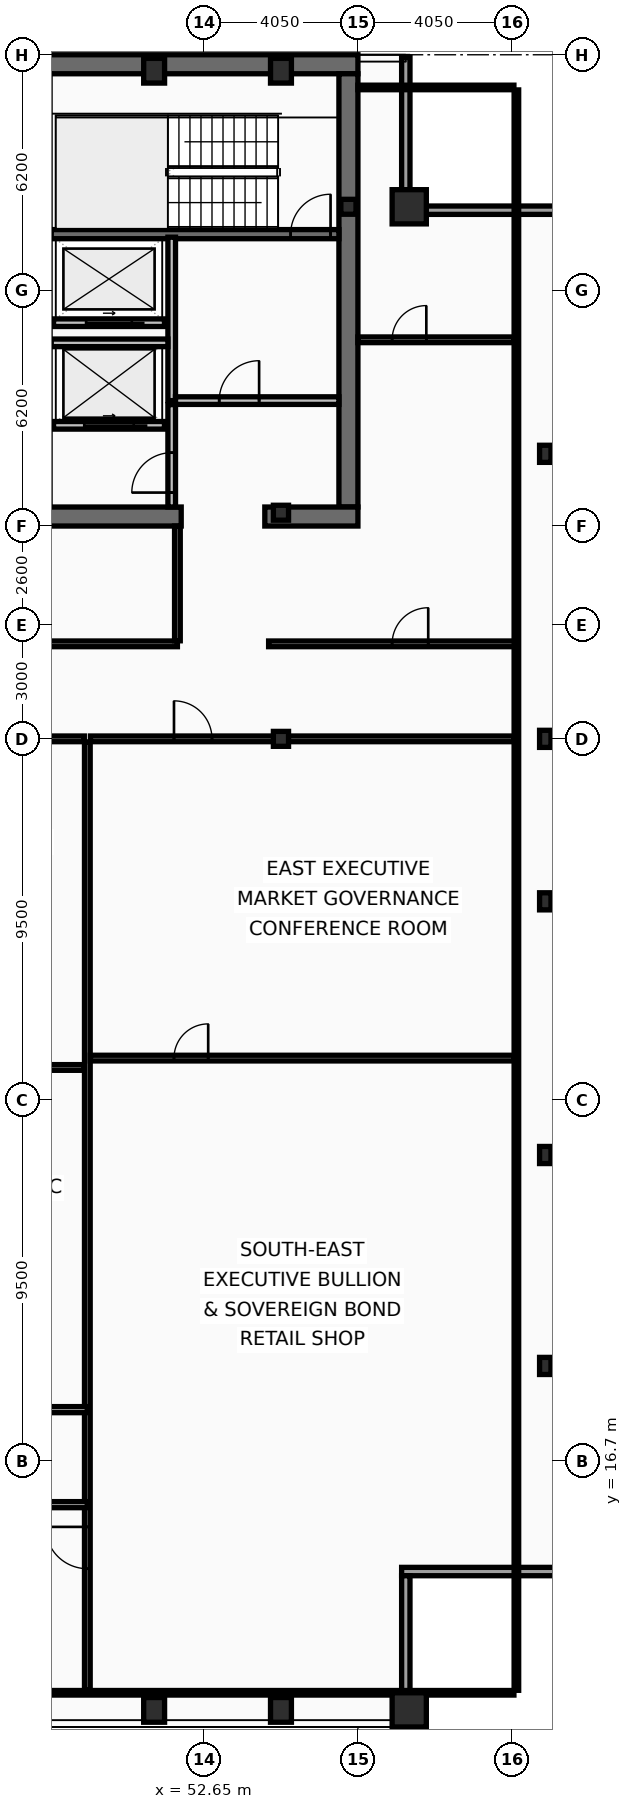
"""IFC4 building model, lengths in metres.
Left out: names, types, materials, properties, quantities, classifications, styles, units other than length and angle.
Written with IfcOpenShell. Run it as: python <this file> out.ifc"""

import sys

from ifc_helpers import new_model, si_unit, direction, frame, frame_2d, origin, origin_2d, place, context, subcontext, project, spatial, rectangle, hollow_rectangle, i_section, extrude, element, fill, save


model = new_model("IFC4")
c1 = context("Model", 3, precision=1e-05, world=origin(), true_north=direction((0.0, 1.0)))
c2 = subcontext(c1, "Body", "Model", "MODEL_VIEW")
j1 = project(units=[si_unit("LENGTHUNIT", "METRE"), si_unit("PLANEANGLEUNIT", "RADIAN")], contexts=[c1])
p1 = place(None, origin())
s1 = spatial("IfcSite", under=j1, at=p1, CompositionType="ELEMENT")
p2 = place(p1, origin())
s2 = spatial("IfcBuilding", under=s1, at=p2, CompositionType="ELEMENT")
p3 = place(p2, frame((0.0, 0.0, 347.0)))
s3 = spatial("IfcBuildingStorey", under=s2, at=p3, CompositionType="ELEMENT", Elevation=347.0)
p4 = place(p3, frame((16.2, 53.45, 0.0), z_axis=(0.0, 0.0, 1.0), x_axis=(1.0, 0.0, 0.0)))
e1 = element("IfcWall", 1, at=p4, inside=s3, PredefinedType="SHEAR", context=c2, shape_type="SweptSolid", body=[
    extrude(rectangle(XDim=40.5, YDim=0.5, at=frame_2d((20.25, 0.0))), origin(), (0.0, 0.0, 1.0), 3.38),
])
p5 = place(p3, frame((56.45, 53.2, 0.0), z_axis=(0.0, 0.0, 1.0), x_axis=(0.0, -1.0, 0.0)))
e2 = element("IfcWall", 2, at=p5, inside=s3, PredefinedType="SHEAR", context=c2, shape_type="SweptSolid", body=[
    extrude(rectangle(XDim=11.4, YDim=0.5, at=frame_2d((5.7, 0.0))), origin(), (0.0, 0.0, 1.0), 3.38),
])
p6 = place(p3, frame((52.05, 41.55, 0.0), z_axis=(0.0, 0.0, 1.0), x_axis=(-1.0, 0.0, 0.0)))
e3 = element("IfcWall", 3, at=p6, inside=s3, PredefinedType="SHEAR", context=c2, shape_type="SweptSolid", body=[
    extrude(rectangle(XDim=11.3, YDim=0.5, at=frame_2d((5.65, 0.0))), origin(), (0.0, 0.0, 1.0), 3.38),
])
p7 = place(p3, frame((56.7, 41.55, 0.0), z_axis=(0.0, 0.0, 1.0), x_axis=(-1.0, 0.0, 0.0)))
e4 = element("IfcWall", 4, at=p7, inside=s3, PredefinedType="SHEAR", context=c2, shape_type="SweptSolid", body=[
    extrude(rectangle(XDim=2.45, YDim=0.5, at=frame_2d((1.225, 0.0))), origin(), (0.0, 0.0, 1.0), 3.38),
])
p8 = place(p3, frame((48.63, 48.98, 0.0), z_axis=(0.0, 0.0, 1.0), x_axis=(1.0, 0.0, 0.0)))
e5 = element("IfcWall", 5, at=p8, inside=s3, PredefinedType="SHEAR", context=c2, shape_type="SweptSolid", body=[
    extrude(rectangle(XDim=7.57, YDim=0.24, at=frame_2d((3.785, 0.0))), origin(), (0.0, 0.0, 1.0), 3.38),
])
p9 = place(p8, frame((6.3, 0.0, 0.0)))
e6 = element("IfcOpeningElement", 6, at=p9, cuts=e5, PredefinedType="OPENING", context=c2, shape_type="SweptSolid", body=[
    extrude(rectangle(XDim=1.05, YDim=2.15, at=frame_2d((0.525, 1.075))), frame((0.0, 0.13, 0.0), z_axis=(0.0, -1.0, 0.0), x_axis=(1.0, 0.0, 0.0)), (0.0, 0.0, 1.0), 0.26),
])
for number, where, z_axis, x_axis in (
    (7, (58.05, 10.15, 0.0), (0.0, 0.0, 1.0), (1.0, 0.0, 0.0)),
    (8, (58.05, 49.7, 0.0), (0.0, 0.0, 1.0), (1.0, 0.0, 0.0)),
):
    element("IfcColumn", number, at=place(p3, frame(where, z_axis=z_axis, x_axis=x_axis)), inside=s3, PredefinedType="COLUMN", context=c2, shape_type="SweptSolid", body=[
        extrude(hollow_rectangle(XDim=0.9, YDim=0.9, WallThickness=0.05, at=origin_2d()), origin(), (0.0, 0.0, 1.0), 3.6),
    ])
for number, where, z_axis, x_axis in (
    (9, (51.337, 10.15, 0.0), (0.0, 0.0, 1.0), (1.0, 0.0, 0.0)),
    (10, (54.675, 10.15, 0.0), (0.0, 0.0, 1.0), (1.0, 0.0, 0.0)),
    (11, (51.337, 53.28, 0.0), (0.0, 0.0, 1.0), (1.0, 0.0, 0.0)),
    (12, (54.675, 53.28, 0.0), (0.0, 0.0, 1.0), (1.0, 0.0, 0.0)),
):
    element("IfcColumn", number, at=place(p3, frame(where, z_axis=z_axis, x_axis=x_axis)), inside=s3, PredefinedType="COLUMN", context=c2, shape_type="SweptSolid", body=[
        extrude(hollow_rectangle(XDim=0.55, YDim=0.65, WallThickness=0.04, at=origin_2d()), origin(), (0.0, 0.0, 1.0), 3.6),
    ])
for number, where, z_axis, x_axis in (
    (13, (61.63, 19.2, 0.0), (0.0, 0.0, 1.0), (1.0, 0.0, 0.0)),
    (14, (61.63, 24.75, 0.0), (0.0, 0.0, 1.0), (1.0, 0.0, 0.0)),
    (15, (61.63, 31.425, 0.0), (0.0, 0.0, 1.0), (1.0, 0.0, 0.0)),
    (16, (61.63, 35.7, 0.0), (0.0, 0.0, 1.0), (1.0, 0.0, 0.0)),
    (17, (61.63, 43.2, 0.0), (0.0, 0.0, 1.0), (1.0, 0.0, 0.0)),
):
    element("IfcColumn", number, at=place(p3, frame(where, z_axis=z_axis, x_axis=x_axis)), inside=s3, PredefinedType="COLUMN", context=c2, shape_type="SweptSolid", body=[
        extrude(i_section(OverallWidth=0.3, OverallDepth=0.45, WebThickness=0.014, FlangeThickness=0.026, at=origin_2d()), origin(), (0.0, 0.0, 1.0), 3.6),
    ])
for number, where, z_axis, x_axis in (
    (18, (56.45, 49.7, 0.0), (0.0, 0.0, 1.0), (1.0, 0.0, 0.0)),
    (19, (54.675, 35.7, 0.0), (0.0, 0.0, 1.0), (1.0, 0.0, 0.0)),
    (20, (54.675, 41.65, 0.0), (0.0, 0.0, 1.0), (1.0, 0.0, 0.0)),
):
    element("IfcColumn", number, at=place(p3, frame(where, z_axis=z_axis, x_axis=x_axis)), inside=s3, PredefinedType="COLUMN", context=c2, shape_type="SweptSolid", body=[
        extrude(i_section(OverallWidth=0.399, OverallDepth=0.393, WebThickness=0.023, FlangeThickness=0.037, at=origin_2d()), origin(), (0.0, 0.0, 1.0), 3.6),
    ])
p10 = place(p3, frame((57.96, 53.63, 0.0), z_axis=(0.0, 0.0, 1.0), x_axis=(0.0, -1.0, 0.0)))
e21 = element("IfcWall", 21, at=p10, inside=s3, PredefinedType="SOLIDWALL", context=c2, shape_type="SweptSolid", body=[
    extrude(rectangle(XDim=3.91, YDim=0.22, at=frame_2d((1.955, 0.0))), origin(), (0.0, 0.0, 1.0), 2.82),
])
for number, where, z_axis, x_axis in (
    (22, (57.85, 49.61, 0.0), (0.0, 0.0, 1.0), (1.0, 0.0, 0.0)),
    (23, (61.98, 13.79, 0.0), (0.0, 0.0, 1.0), (-1.0, 0.0, 0.0)),
):
    element("IfcWall", number, at=place(p3, frame(where, z_axis=z_axis, x_axis=x_axis)), inside=s3, PredefinedType="SOLIDWALL", context=c2, shape_type="SweptSolid", body=[
        extrude(rectangle(XDim=4.13, YDim=0.22, at=frame_2d((2.065, 0.0))), origin(), (0.0, 0.0, 1.0), 2.82),
    ])
p11 = place(p3, frame((57.96, 13.68, 0.0), z_axis=(0.0, 0.0, 1.0), x_axis=(0.0, -1.0, 0.0)))
e24 = element("IfcWall", 24, at=p11, inside=s3, PredefinedType="SOLIDWALL", context=c2, shape_type="SweptSolid", body=[
    extrude(rectangle(XDim=3.91, YDim=0.22, at=frame_2d((1.955, 0.0))), origin(), (0.0, 0.0, 1.0), 2.82),
])
p12 = place(p3, frame((51.61, 43.95, 0.0), z_axis=(0.0, 0.0, 1.0), x_axis=(-1.0, 0.0, 0.0)))
e25 = element("IfcWall", 25, at=p12, inside=s3, PredefinedType="PARTITIONING", context=c2, shape_type="SweptSolid", body=[
    extrude(rectangle(XDim=2.92, YDim=0.2, at=frame_2d((1.46, 0.0))), origin(), (0.0, 0.0, 1.0), 3.38),
])
p13 = place(p12, frame((0.81, 0.0, 0.0)))
e26 = element("IfcOpeningElement", 26, at=p13, cuts=e25, PredefinedType="OPENING", context=c2, shape_type="SweptSolid", body=[
    extrude(rectangle(XDim=1.3, YDim=2.18, at=frame_2d((0.65, 1.09))), frame((0.0, 0.11, 0.0), z_axis=(0.0, -1.0, 0.0), x_axis=(1.0, 0.0, 0.0)), (0.0, 0.0, 1.0), 0.22),
])
p14 = place(p3, frame((51.61, 46.65, 0.0), z_axis=(0.0, 0.0, 1.0), x_axis=(-1.0, 0.0, 0.0)))
e27 = element("IfcWall", 27, at=p14, inside=s3, PredefinedType="PARTITIONING", context=c2, shape_type="SweptSolid", body=[
    extrude(rectangle(XDim=2.92, YDim=0.2, at=frame_2d((1.46, 0.0))), origin(), (0.0, 0.0, 1.0), 3.38),
])
p15 = place(p14, frame((0.86, 0.0, 0.0)))
e28 = element("IfcOpeningElement", 28, at=p15, cuts=e27, PredefinedType="OPENING", context=c2, shape_type="SweptSolid", body=[
    extrude(rectangle(XDim=1.2, YDim=2.18, at=frame_2d((0.6, 1.09))), frame((0.0, 0.11, 0.0), z_axis=(0.0, -1.0, 0.0), x_axis=(1.0, 0.0, 0.0)), (0.0, 0.0, 1.0), 0.22),
])
p16 = place(p3, frame((51.8, 44.6, 0.0), z_axis=(0.0, 0.0, 1.0), x_axis=(0.0, 1.0, 0.0)))
e29 = element("IfcWall", 29, at=p16, inside=s3, PredefinedType="PARTITIONING", context=c2, shape_type="SweptSolid", body=[
    extrude(rectangle(XDim=4.3, YDim=0.2, at=frame_2d((2.15, 0.0))), origin(), (0.0, 0.0, 1.0), 3.38),
])
p17 = place(p3, frame((51.9, 44.6, 0.0), z_axis=(0.0, 0.0, 1.0), x_axis=(1.0, 0.0, 0.0)))
e30 = element("IfcWall", 30, at=p17, inside=s3, PredefinedType="PARTITIONING", context=c2, shape_type="SweptSolid", body=[
    extrude(rectangle(XDim=4.3, YDim=0.2, at=frame_2d((2.15, 0.0))), origin(), (0.0, 0.0, 1.0), 3.38),
])
p18 = place(p17, frame((1.15, 0.0, 0.0)))
e31 = element("IfcOpeningElement", 31, at=p18, cuts=e30, PredefinedType="OPENING", context=c2, shape_type="SweptSolid", body=[
    extrude(rectangle(XDim=1.05, YDim=2.15, at=frame_2d((0.525, 1.075))), frame((0.0, 0.11, 0.0), z_axis=(0.0, -1.0, 0.0), x_axis=(1.0, 0.0, 0.0)), (0.0, 0.0, 1.0), 0.22),
])
p19 = place(p3, frame((48.63, 46.12, 0.0), z_axis=(0.0, 0.0, 1.0), x_axis=(1.0, 0.0, 0.0)))
e32 = element("IfcWall", 32, at=p19, inside=s3, PredefinedType="PARTITIONING", context=c2, shape_type="SweptSolid", body=[
    extrude(rectangle(XDim=3.07, YDim=0.2, at=frame_2d((1.535, 0.0))), origin(), (0.0, 0.0, 1.0), 3.38),
])
p20 = place(p3, frame((51.8, 41.8, 0.0), z_axis=(0.0, 0.0, 1.0), x_axis=(0.0, 1.0, 0.0)))
e33 = element("IfcWall", 33, at=p20, inside=s3, PredefinedType="PARTITIONING", context=c2, shape_type="SweptSolid", body=[
    extrude(rectangle(XDim=2.695, YDim=0.2, at=frame_2d((1.348, 0.0))), origin(), (0.0, 0.0, 1.0), 3.38),
])
p21 = place(p20, frame((0.38, 0.0, 0.0)))
e34 = element("IfcOpeningElement", 34, at=p21, cuts=e33, PredefinedType="OPENING", context=c2, shape_type="SweptSolid", body=[
    extrude(rectangle(XDim=1.05, YDim=2.15, at=frame_2d((0.525, 1.075))), frame((0.0, 0.11, 0.0), z_axis=(0.0, -1.0, 0.0), x_axis=(1.0, 0.0, 0.0)), (0.0, 0.0, 1.0), 0.22),
])
p22 = place(p3, frame((45.55, 38.2, 0.0), z_axis=(0.0, 0.0, 1.0), x_axis=(1.0, 0.0, 0.0)))
e35 = element("IfcWall", 35, at=p22, inside=s3, PredefinedType="PARTITIONING", context=c2, shape_type="SweptSolid", body=[
    extrude(rectangle(XDim=6.4, YDim=0.15, at=frame_2d((3.2, 0.0))), origin(), (0.0, 0.0, 1.0), 2.77),
])
p23 = place(p22, frame((1.1, 0.0, 0.0)))
e36 = element("IfcOpeningElement", 36, at=p23, cuts=e35, PredefinedType="OPENING", context=c2, shape_type="SweptSolid", body=[
    extrude(rectangle(XDim=1.0, YDim=2.05, at=frame_2d((0.5, 1.025))), frame((0.0, 0.085, 0.0), z_axis=(0.0, -1.0, 0.0), x_axis=(1.0, 0.0, 0.0)), (0.0, 0.0, 1.0), 0.17),
])
p24 = place(p3, frame((51.95, 38.28, 0.0), z_axis=(0.0, 0.0, 1.0), x_axis=(0.0, 1.0, 0.0)))
e37 = element("IfcWall", 37, at=p24, inside=s3, PredefinedType="PARTITIONING", context=c2, shape_type="SweptSolid", body=[
    extrude(rectangle(XDim=3.02, YDim=0.15, at=frame_2d((1.51, 0.0))), origin(), (0.0, 0.0, 1.0), 3.38),
])
p25 = place(p3, frame((54.35, 38.2, 0.0), z_axis=(0.0, 0.0, 1.0), x_axis=(1.0, 0.0, 0.0)))
e38 = element("IfcWall", 38, at=p25, inside=s3, PredefinedType="PARTITIONING", context=c2, shape_type="SweptSolid", body=[
    extrude(rectangle(XDim=6.52, YDim=0.15, at=frame_2d((3.26, 0.0))), origin(), (0.0, 0.0, 1.0), 2.77),
])
p26 = place(p25, frame((3.25, 0.0, 0.0)))
e39 = element("IfcOpeningElement", 39, at=p26, cuts=e38, PredefinedType="OPENING", context=c2, shape_type="SweptSolid", body=[
    extrude(rectangle(XDim=0.95, YDim=2.05, at=frame_2d((0.475, 1.025))), frame((0.0, 0.085, 0.0), z_axis=(0.0, -1.0, 0.0), x_axis=(1.0, 0.0, 0.0)), (0.0, 0.0, 1.0), 0.17),
])
p27 = place(p3, frame((56.7, 46.2, 0.0), z_axis=(0.0, 0.0, 1.0), x_axis=(1.0, 0.0, 0.0)))
e40 = element("IfcWall", 40, at=p27, inside=s3, PredefinedType="PARTITIONING", context=c2, shape_type="SweptSolid", body=[
    extrude(rectangle(XDim=4.105, YDim=0.15, at=frame_2d((2.052, 0.0))), origin(), (0.0, 0.0, 1.0), 2.82),
])
p28 = place(p27, frame((0.9, 0.0, 0.0)))
e41 = element("IfcOpeningElement", 41, at=p28, cuts=e40, PredefinedType="OPENING", context=c2, shape_type="SweptSolid", body=[
    extrude(rectangle(XDim=0.9, YDim=2.05, at=frame_2d((0.45, 1.025))), frame((0.0, 0.085, 0.0), z_axis=(0.0, -1.0, 0.0), x_axis=(1.0, 0.0, 0.0)), (0.0, 0.0, 1.0), 0.17),
])
p29 = place(p3, frame((49.58, 10.665, 0.0), z_axis=(0.0, 0.0, 1.0), x_axis=(0.0, 1.0, 0.0)))
e42 = element("IfcWall", 42, at=p29, inside=s3, PredefinedType="PARTITIONING", context=c2, shape_type="SweptSolid", body=[
    extrude(rectangle(XDim=24.955, YDim=0.15, at=frame_2d((12.478, 0.0))), origin(), (0.0, 0.0, 1.0), 3.01),
])
p30 = place(p29, frame((3.2, 0.0, 0.0)))
e43 = element("IfcOpeningElement", 43, at=p30, cuts=e42, PredefinedType="OPENING", context=c2, shape_type="SweptSolid", body=[
    extrude(rectangle(XDim=1.1, YDim=2.1, at=frame_2d((0.55, 1.05))), frame((0.0, 0.085, 0.0), z_axis=(0.0, -1.0, 0.0), x_axis=(1.0, 0.0, 0.0)), (0.0, 0.0, 1.0), 0.17),
])
p31 = place(p3, frame((24.48, 35.7, 0.0), z_axis=(0.0, 0.0, 1.0), x_axis=(1.0, 0.0, 0.0)))
e44 = element("IfcWall", 44, at=p31, inside=s3, PredefinedType="PARTITIONING", context=c2, shape_type="SweptSolid", body=[
    extrude(rectangle(XDim=25.02, YDim=0.15, at=frame_2d((12.51, 0.0))), origin(), (0.0, 0.0, 1.0), 2.77),
])
p32 = place(p3, frame((49.66, 35.7, 0.0), z_axis=(0.0, 0.0, 1.0), x_axis=(1.0, 0.0, 0.0)))
e45 = element("IfcWall", 45, at=p32, inside=s3, PredefinedType="PARTITIONING", context=c2, shape_type="SweptSolid", body=[
    extrude(rectangle(XDim=11.145, YDim=0.15, at=frame_2d((5.573, 0.0))), origin(), (0.0, 0.0, 1.0), 2.77),
])
p33 = place(p32, frame((2.2, 0.0, 0.0)))
e46 = element("IfcOpeningElement", 46, at=p33, cuts=e45, PredefinedType="OPENING", context=c2, shape_type="SweptSolid", body=[
    extrude(rectangle(XDim=1.0, YDim=2.05, at=frame_2d((0.5, 1.025))), frame((0.0, 0.085, 0.0), z_axis=(0.0, -1.0, 0.0), x_axis=(1.0, 0.0, 0.0)), (0.0, 0.0, 1.0), 0.17),
])
p34 = place(p3, frame((49.66, 27.3, 0.0), z_axis=(0.0, 0.0, 1.0), x_axis=(1.0, 0.0, 0.0)))
e47 = element("IfcWall", 47, at=p34, inside=s3, PredefinedType="PARTITIONING", context=c2, shape_type="SweptSolid", body=[
    extrude(rectangle(XDim=11.145, YDim=0.15, at=frame_2d((5.573, 0.0))), origin(), (0.0, 0.0, 1.0), 2.77),
])
p35 = place(p34, frame((2.2, 0.0, 0.0)))
e48 = element("IfcOpeningElement", 48, at=p35, cuts=e47, PredefinedType="OPENING", context=c2, shape_type="SweptSolid", body=[
    extrude(rectangle(XDim=0.9, YDim=2.05, at=frame_2d((0.45, 1.025))), frame((0.0, 0.085, 0.0), z_axis=(0.0, -1.0, 0.0), x_axis=(1.0, 0.0, 0.0)), (0.0, 0.0, 1.0), 0.17),
])
p36 = place(p3, frame((43.956, 18.05, 0.0), z_axis=(0.0, 0.0, 1.0), x_axis=(1.0, 0.0, 0.0)))
e49 = element("IfcWall", 49, at=p36, inside=s3, PredefinedType="PARTITIONING", context=c2, shape_type="SweptSolid", body=[
    extrude(rectangle(XDim=5.624, YDim=0.16, at=frame_2d((2.812, 0.0))), origin(), (0.0, 0.0, 1.0), 2.77),
])
p37 = place(p36, frame((2.862, 0.0, 0.0)))
e50 = element("IfcOpeningElement", 50, at=p37, cuts=e49, PredefinedType="OPENING", context=c2, shape_type="SweptSolid", body=[
    extrude(rectangle(XDim=1.0, YDim=2.05, at=frame_2d((0.5, 1.025))), frame((0.0, 0.09, 0.0), z_axis=(0.0, -1.0, 0.0), x_axis=(1.0, 0.0, 0.0)), (0.0, 0.0, 1.0), 0.18),
])
p38 = place(p3, frame((44.036, 27.054, 0.0), z_axis=(0.0, 0.0, 1.0), x_axis=(1.0, 0.0, 0.0)))
e51 = element("IfcWall", 51, at=p38, inside=s3, PredefinedType="PARTITIONING", context=c2, shape_type="SweptSolid", body=[
    extrude(rectangle(XDim=5.464, YDim=0.15, at=frame_2d((2.732, 0.0))), origin(), (0.0, 0.0, 1.0), 2.77),
])
p39 = place(p38, frame((2.531, 0.0, 0.0)))
e52 = element("IfcOpeningElement", 52, at=p39, cuts=e51, PredefinedType="OPENING", context=c2, shape_type="SweptSolid", body=[
    extrude(rectangle(XDim=0.9, YDim=2.05, at=frame_2d((0.45, 1.025))), frame((0.0, 0.085, 0.0), z_axis=(0.0, -1.0, 0.0), x_axis=(1.0, 0.0, 0.0)), (0.0, 0.0, 1.0), 0.17),
])
p40 = place(p3, frame((36.532, 15.55, 0.0), z_axis=(0.0, 0.0, 1.0), x_axis=(1.0, 0.0, 0.0)))
e53 = element("IfcWall", 53, at=p40, inside=s3, PredefinedType="PARTITIONING", context=c2, shape_type="SweptSolid", body=[
    extrude(rectangle(XDim=13.048, YDim=0.16, at=frame_2d((6.524, 0.0))), origin(), (0.0, 0.0, 1.0), 2.77),
])
p41 = place(p40, frame((5.98, 0.0, 0.0)))
e54 = element("IfcOpeningElement", 54, at=p41, cuts=e53, PredefinedType="OPENING", context=c2, shape_type="SweptSolid", body=[
    extrude(rectangle(XDim=1.0, YDim=2.05, at=frame_2d((0.5, 1.025))), frame((0.0, 0.09, 0.0), z_axis=(0.0, -1.0, 0.0), x_axis=(1.0, 0.0, 0.0)), (0.0, 0.0, 1.0), 0.18),
])
p42 = place(p3, frame((60.87, 10.665, 0.0), z_axis=(0.0, 0.0, 1.0), x_axis=(0.0, 1.0, 0.0)))
e55 = element("IfcWall", 55, at=p42, inside=s3, PredefinedType="PARTITIONING", context=c2, shape_type="SweptSolid", body=[
    extrude(rectangle(XDim=42.11, YDim=0.12, at=frame_2d((21.055, 0.0))), origin(), (0.0, 0.0, 1.0), 2.77),
])
p43 = place(p3, frame((56.7, 52.84, 0.0), z_axis=(0.0, 0.0, 1.0), x_axis=(1.0, 0.0, 0.0)))
e56 = element("IfcWall", 56, at=p43, inside=s3, PredefinedType="PARTITIONING", context=c2, shape_type="SweptSolid", body=[
    extrude(rectangle(XDim=4.105, YDim=0.12, at=frame_2d((2.052, 0.0))), origin(), (0.0, 0.0, 1.0), 3.38),
])
p44 = place(p3, frame((12.095, 10.6, 0.0), z_axis=(0.0, 0.0, 1.0), x_axis=(1.0, 0.0, 0.0)))
e57 = element("IfcWall", 57, at=p44, inside=s3, PredefinedType="PARTITIONING", context=c2, shape_type="SweptSolid", body=[
    extrude(rectangle(XDim=48.71, YDim=0.12, at=frame_2d((24.355, 0.0))), origin(), (0.0, 0.0, 1.0), 2.77),
])
p45 = place(p9, origin())
e58 = element("IfcDoor", 58, at=p45, inside=s3, OperationType="SINGLE_SWING_RIGHT", PredefinedType="DOOR", context=c2, shape_type="SweptSolid", body=[
    extrude(rectangle(XDim=1.05, YDim=2.15, at=frame_2d((0.525, 1.075))), frame((0.0, 0.025, 0.0), z_axis=(0.0, -1.0, 0.0), x_axis=(1.0, 0.0, 0.0)), (0.0, 0.0, 1.0), 0.05),
])
fill(e6, e58)
p46 = place(p13, origin())
e59 = element("IfcDoor", 59, at=p46, inside=s3, OperationType="SLIDING_TO_LEFT", PredefinedType="DOOR", context=c2, shape_type="SweptSolid", body=[
    extrude(rectangle(XDim=1.3, YDim=2.18, at=frame_2d((0.65, 1.09))), frame((0.0, 0.025, 0.0), z_axis=(0.0, -1.0, 0.0), x_axis=(1.0, 0.0, 0.0)), (0.0, 0.0, 1.0), 0.05),
])
fill(e26, e59)
p47 = place(p15, origin())
e60 = element("IfcDoor", 60, at=p47, inside=s3, OperationType="SLIDING_TO_LEFT", PredefinedType="DOOR", context=c2, shape_type="SweptSolid", body=[
    extrude(rectangle(XDim=1.2, YDim=2.18, at=frame_2d((0.6, 1.09))), frame((0.0, 0.025, 0.0), z_axis=(0.0, -1.0, 0.0), x_axis=(1.0, 0.0, 0.0)), (0.0, 0.0, 1.0), 0.05),
])
fill(e28, e60)
p48 = place(p18, origin())
e61 = element("IfcDoor", 61, at=p48, inside=s3, OperationType="SINGLE_SWING_RIGHT", PredefinedType="DOOR", context=c2, shape_type="SweptSolid", body=[
    extrude(rectangle(XDim=1.05, YDim=2.15, at=frame_2d((0.525, 1.075))), frame((0.0, 0.025, 0.0), z_axis=(0.0, -1.0, 0.0), x_axis=(1.0, 0.0, 0.0)), (0.0, 0.0, 1.0), 0.05),
])
fill(e31, e61)
p49 = place(p21, origin())
e62 = element("IfcDoor", 62, at=p49, inside=s3, OperationType="SINGLE_SWING_LEFT", PredefinedType="DOOR", context=c2, shape_type="SweptSolid", body=[
    extrude(rectangle(XDim=1.05, YDim=2.15, at=frame_2d((0.525, 1.075))), frame((0.0, 0.025, 0.0), z_axis=(0.0, -1.0, 0.0), x_axis=(1.0, 0.0, 0.0)), (0.0, 0.0, 1.0), 0.05),
])
fill(e34, e62)
p50 = place(p26, origin())
e63 = element("IfcDoor", 63, at=p50, inside=s3, OperationType="SINGLE_SWING_RIGHT", PredefinedType="DOOR", context=c2, shape_type="SweptSolid", body=[
    extrude(rectangle(XDim=0.95, YDim=2.05, at=frame_2d((0.475, 1.025))), frame((0.0, 0.025, 0.0), z_axis=(0.0, -1.0, 0.0), x_axis=(1.0, 0.0, 0.0)), (0.0, 0.0, 1.0), 0.05),
])
fill(e39, e63)
p51 = place(p28, origin())
e64 = element("IfcDoor", 64, at=p51, inside=s3, OperationType="SINGLE_SWING_RIGHT", PredefinedType="DOOR", context=c2, shape_type="SweptSolid", body=[
    extrude(rectangle(XDim=0.9, YDim=2.05, at=frame_2d((0.45, 1.025))), frame((0.0, 0.025, 0.0), z_axis=(0.0, -1.0, 0.0), x_axis=(1.0, 0.0, 0.0)), (0.0, 0.0, 1.0), 0.05),
])
fill(e41, e64)
p52 = place(p30, origin())
e65 = element("IfcDoor", 65, at=p52, inside=s3, OperationType="SINGLE_SWING_RIGHT", PredefinedType="DOOR", context=c2, shape_type="SweptSolid", body=[
    extrude(rectangle(XDim=1.1, YDim=2.1, at=frame_2d((0.55, 1.05))), frame((0.0, 0.025, 0.0), z_axis=(0.0, -1.0, 0.0), x_axis=(1.0, 0.0, 0.0)), (0.0, 0.0, 1.0), 0.05),
])
fill(e43, e65)
p53 = place(p33, origin())
e66 = element("IfcDoor", 66, at=p53, inside=s3, OperationType="SINGLE_SWING_LEFT", PredefinedType="DOOR", context=c2, shape_type="SweptSolid", body=[
    extrude(rectangle(XDim=1.0, YDim=2.05, at=frame_2d((0.5, 1.025))), frame((0.0, 0.025, 0.0), z_axis=(0.0, -1.0, 0.0), x_axis=(1.0, 0.0, 0.0)), (0.0, 0.0, 1.0), 0.05),
])
fill(e46, e66)
p54 = place(p35, origin())
e67 = element("IfcDoor", 67, at=p54, inside=s3, OperationType="SINGLE_SWING_RIGHT", PredefinedType="DOOR", context=c2, shape_type="SweptSolid", body=[
    extrude(rectangle(XDim=0.9, YDim=2.05, at=frame_2d((0.45, 1.025))), frame((0.0, 0.025, 0.0), z_axis=(0.0, -1.0, 0.0), x_axis=(1.0, 0.0, 0.0)), (0.0, 0.0, 1.0), 0.05),
])
fill(e48, e67)
save(model, sys.argv[1])
